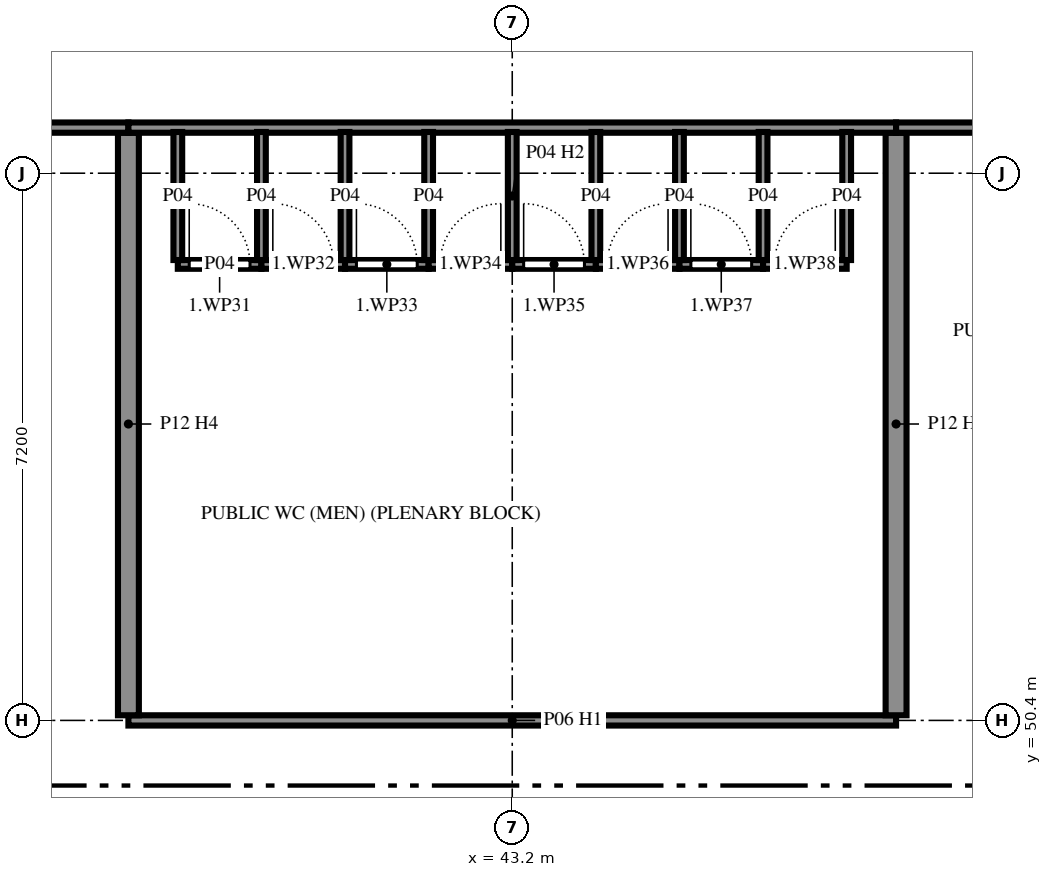
"""IFC4 building model, lengths in metres.
Left out: names, types, materials, properties, quantities, classifications, styles, units other than length and angle.
Written with IfcOpenShell. Run it as: python <this file> out.ifc"""

import sys

from ifc_helpers import new_model, si_unit, direction, frame, frame_2d, origin, place, context, subcontext, project, spatial, rectangle, extrude, element, fill, save


model = new_model("IFC4")
c1 = context("Model", 3, precision=1e-05, world=origin(), true_north=direction((0.0, 1.0)))
c2 = subcontext(c1, "Body", "Model", "MODEL_VIEW")
j1 = project(units=[si_unit("LENGTHUNIT", "METRE"), si_unit("PLANEANGLEUNIT", "RADIAN")], contexts=[c1])
p1 = place(None, origin())
s1 = spatial("IfcSite", under=j1, at=p1, CompositionType="ELEMENT")
p2 = place(p1, origin())
s2 = spatial("IfcBuilding", under=s1, at=p2, CompositionType="ELEMENT")
p3 = place(p2, frame((0.0, 0.0, 3.6)))
s3 = spatial("IfcBuildingStorey", under=s2, at=p3, CompositionType="ELEMENT", Elevation=3.6)
p4 = place(p3, frame((36.0, 50.4, 0.0), z_axis=(0.0, 0.0, 1.0), x_axis=(1.0, 0.0, 0.0)))
e1 = element("IfcWall", 1, at=p4, inside=s3, PredefinedType="PARTITIONING", context=c2, shape_type="SweptSolid", body=[
    extrude(rectangle(XDim=2.15, YDim=0.135, at=frame_2d((1.075, 0.0))), origin(), (0.0, 0.0, 1.0), 2.82),
])
p5 = place(p3, frame((38.15, 50.4, 0.0), z_axis=(0.0, 0.0, 1.0), x_axis=(1.0, 0.0, 0.0)))
e2 = element("IfcWall", 2, at=p5, inside=s3, PredefinedType="PARTITIONING", context=c2, shape_type="SweptSolid", body=[
    extrude(rectangle(XDim=10.1, YDim=0.135, at=frame_2d((5.05, 0.0))), origin(), (0.0, 0.0, 1.0), 2.82),
])
p6 = place(p5, frame((4.55, 0.0, 0.0)))
e3 = element("IfcOpeningElement", 3, at=p6, cuts=e2, PredefinedType="OPENING", context=c2, shape_type="SweptSolid", body=[
    extrude(rectangle(XDim=1.0, YDim=2.4, at=frame_2d((0.5, 1.2))), frame((0.0, 0.077, 0.0), z_axis=(0.0, -1.0, 0.0), x_axis=(1.0, 0.0, 0.0)), (0.0, 0.0, 1.0), 0.155),
])
p7 = place(p3, frame((48.25, 50.4, 0.0), z_axis=(0.0, 0.0, 1.0), x_axis=(1.0, 0.0, 0.0)))
e4 = element("IfcWall", 4, at=p7, inside=s3, PredefinedType="PARTITIONING", context=c2, shape_type="SweptSolid", body=[
    extrude(rectangle(XDim=2.15, YDim=0.135, at=frame_2d((1.075, 0.0))), origin(), (0.0, 0.0, 1.0), 2.82),
])
p8 = place(p3, frame((38.15, 58.133, 0.0), z_axis=(0.0, 0.0, 1.0), x_axis=(0.0, -1.0, 0.0)))
e5 = element("IfcWall", 5, at=p8, inside=s3, PredefinedType="PARTITIONING", context=c2, shape_type="SweptSolid", body=[
    extrude(rectangle(XDim=7.665, YDim=0.275, at=frame_2d((3.833, 0.0))), origin(), (0.0, 0.0, 1.0), 3.42),
])
p9 = place(p3, frame((28.1, 58.2, 0.0), z_axis=(0.0, 0.0, 1.0), x_axis=(1.0, 0.0, 0.0)))
e6 = element("IfcWall", 6, at=p9, inside=s3, PredefinedType="PARTITIONING", context=c2, shape_type="SweptSolid", body=[
    extrude(rectangle(XDim=10.05, YDim=0.135, at=frame_2d((5.025, 0.0))), origin(), (0.0, 0.0, 1.0), 3.42),
])
p10 = place(p9, frame((4.55, 0.0, 0.0)))
e7 = element("IfcOpeningElement", 7, at=p10, cuts=e6, PredefinedType="OPENING", context=c2, shape_type="SweptSolid", body=[
    extrude(rectangle(XDim=1.0, YDim=2.4, at=frame_2d((0.5, 1.2))), frame((0.0, 0.077, 0.0), z_axis=(0.0, -1.0, 0.0), x_axis=(1.0, 0.0, 0.0)), (0.0, 0.0, 1.0), 0.155),
])
p11 = place(p3, frame((48.25, 58.133, 0.0), z_axis=(0.0, 0.0, 1.0), x_axis=(0.0, -1.0, 0.0)))
e8 = element("IfcWall", 8, at=p11, inside=s3, PredefinedType="PARTITIONING", context=c2, shape_type="SweptSolid", body=[
    extrude(rectangle(XDim=7.665, YDim=0.275, at=frame_2d((3.833, 0.0))), origin(), (0.0, 0.0, 1.0), 3.42),
])
p12 = place(p3, frame((38.15, 58.2, 0.0), z_axis=(0.0, 0.0, 1.0), x_axis=(1.0, 0.0, 0.0)))
e9 = element("IfcWall", 9, at=p12, inside=s3, PredefinedType="PARTITIONING", context=c2, shape_type="SweptSolid", body=[
    extrude(rectangle(XDim=10.1, YDim=0.135, at=frame_2d((5.05, 0.0))), origin(), (0.0, 0.0, 1.0), 3.42),
])
p13 = place(p3, frame((48.25, 58.2, 0.0), z_axis=(0.0, 0.0, 1.0), x_axis=(1.0, 0.0, 0.0)))
e10 = element("IfcWall", 10, at=p13, inside=s3, PredefinedType="PARTITIONING", context=c2, shape_type="SweptSolid", body=[
    extrude(rectangle(XDim=10.05, YDim=0.135, at=frame_2d((5.025, 0.0))), origin(), (0.0, 0.0, 1.0), 3.42),
])
p14 = place(p13, frame((4.55, 0.0, 0.0)))
e11 = element("IfcOpeningElement", 11, at=p14, cuts=e10, PredefinedType="OPENING", context=c2, shape_type="SweptSolid", body=[
    extrude(rectangle(XDim=1.0, YDim=2.4, at=frame_2d((0.5, 1.2))), frame((0.0, 0.077, 0.0), z_axis=(0.0, -1.0, 0.0), x_axis=(1.0, 0.0, 0.0)), (0.0, 0.0, 1.0), 0.155),
])
p15 = place(p3, frame((38.8, 56.4, 0.0), z_axis=(0.0, 0.0, 1.0), x_axis=(1.0, 0.0, 0.0)))
e12 = element("IfcWall", 12, at=p15, inside=s3, PredefinedType="PARTITIONING", context=c2, shape_type="SweptSolid", body=[
    extrude(rectangle(XDim=1.1, YDim=0.115, at=frame_2d((0.55, 0.0))), origin(), (0.0, 0.0, 1.0), 3.42),
])
p16 = place(p15, frame((0.15, 0.0, 0.0)))
e13 = element("IfcOpeningElement", 13, at=p16, cuts=e12, PredefinedType="OPENING", context=c2, shape_type="SweptSolid", body=[
    extrude(rectangle(XDim=0.8, YDim=2.1, at=frame_2d((0.4, 1.05))), frame((0.0, 0.067, 0.0), z_axis=(0.0, -1.0, 0.0), x_axis=(1.0, 0.0, 0.0)), (0.0, 0.0, 1.0), 0.135),
])
p17 = place(p3, frame((38.8, 58.143, 0.0), z_axis=(0.0, 0.0, 1.0), x_axis=(0.0, -1.0, 0.0)))
e14 = element("IfcWall", 14, at=p17, inside=s3, PredefinedType="PARTITIONING", context=c2, shape_type="SweptSolid", body=[
    extrude(rectangle(XDim=1.685, YDim=0.115, at=frame_2d((0.843, 0.0))), origin(), (0.0, 0.0, 1.0), 3.42),
])
p18 = place(p3, frame((39.9, 56.4, 0.0), z_axis=(0.0, 0.0, 1.0), x_axis=(1.0, 0.0, 0.0)))
e15 = element("IfcWall", 15, at=p18, inside=s3, PredefinedType="PARTITIONING", context=c2, shape_type="SweptSolid", body=[
    extrude(rectangle(XDim=1.1, YDim=0.115, at=frame_2d((0.55, 0.0))), origin(), (0.0, 0.0, 1.0), 3.42),
])
p19 = place(p18, frame((0.15, 0.0, 0.0)))
e16 = element("IfcOpeningElement", 16, at=p19, cuts=e15, PredefinedType="OPENING", context=c2, shape_type="SweptSolid", body=[
    extrude(rectangle(XDim=0.8, YDim=2.1, at=frame_2d((0.4, 1.05))), frame((0.0, 0.067, 0.0), z_axis=(0.0, -1.0, 0.0), x_axis=(1.0, 0.0, 0.0)), (0.0, 0.0, 1.0), 0.135),
])
p20 = place(p3, frame((39.9, 58.143, 0.0), z_axis=(0.0, 0.0, 1.0), x_axis=(0.0, -1.0, 0.0)))
e17 = element("IfcWall", 17, at=p20, inside=s3, PredefinedType="PARTITIONING", context=c2, shape_type="SweptSolid", body=[
    extrude(rectangle(XDim=1.685, YDim=0.115, at=frame_2d((0.843, 0.0))), origin(), (0.0, 0.0, 1.0), 3.42),
])
p21 = place(p3, frame((41.0, 56.4, 0.0), z_axis=(0.0, 0.0, 1.0), x_axis=(1.0, 0.0, 0.0)))
e18 = element("IfcWall", 18, at=p21, inside=s3, PredefinedType="PARTITIONING", context=c2, shape_type="SweptSolid", body=[
    extrude(rectangle(XDim=1.1, YDim=0.115, at=frame_2d((0.55, 0.0))), origin(), (0.0, 0.0, 1.0), 3.42),
])
p22 = place(p21, frame((0.15, 0.0, 0.0)))
e19 = element("IfcOpeningElement", 19, at=p22, cuts=e18, PredefinedType="OPENING", context=c2, shape_type="SweptSolid", body=[
    extrude(rectangle(XDim=0.8, YDim=2.1, at=frame_2d((0.4, 1.05))), frame((0.0, 0.067, 0.0), z_axis=(0.0, -1.0, 0.0), x_axis=(1.0, 0.0, 0.0)), (0.0, 0.0, 1.0), 0.135),
])
p23 = place(p3, frame((41.0, 58.143, 0.0), z_axis=(0.0, 0.0, 1.0), x_axis=(0.0, -1.0, 0.0)))
e20 = element("IfcWall", 20, at=p23, inside=s3, PredefinedType="PARTITIONING", context=c2, shape_type="SweptSolid", body=[
    extrude(rectangle(XDim=1.685, YDim=0.115, at=frame_2d((0.843, 0.0))), origin(), (0.0, 0.0, 1.0), 3.42),
])
p24 = place(p3, frame((42.1, 56.4, 0.0), z_axis=(0.0, 0.0, 1.0), x_axis=(1.0, 0.0, 0.0)))
e21 = element("IfcWall", 21, at=p24, inside=s3, PredefinedType="PARTITIONING", context=c2, shape_type="SweptSolid", body=[
    extrude(rectangle(XDim=1.1, YDim=0.115, at=frame_2d((0.55, 0.0))), origin(), (0.0, 0.0, 1.0), 3.42),
])
p25 = place(p24, frame((0.15, 0.0, 0.0)))
e22 = element("IfcOpeningElement", 22, at=p25, cuts=e21, PredefinedType="OPENING", context=c2, shape_type="SweptSolid", body=[
    extrude(rectangle(XDim=0.8, YDim=2.1, at=frame_2d((0.4, 1.05))), frame((0.0, 0.067, 0.0), z_axis=(0.0, -1.0, 0.0), x_axis=(1.0, 0.0, 0.0)), (0.0, 0.0, 1.0), 0.135),
])
p26 = place(p3, frame((42.1, 58.143, 0.0), z_axis=(0.0, 0.0, 1.0), x_axis=(0.0, -1.0, 0.0)))
e23 = element("IfcWall", 23, at=p26, inside=s3, PredefinedType="PARTITIONING", context=c2, shape_type="SweptSolid", body=[
    extrude(rectangle(XDim=1.685, YDim=0.115, at=frame_2d((0.843, 0.0))), origin(), (0.0, 0.0, 1.0), 3.42),
])
p27 = place(p3, frame((43.2, 56.4, 0.0), z_axis=(0.0, 0.0, 1.0), x_axis=(1.0, 0.0, 0.0)))
e24 = element("IfcWall", 24, at=p27, inside=s3, PredefinedType="PARTITIONING", context=c2, shape_type="SweptSolid", body=[
    extrude(rectangle(XDim=1.1, YDim=0.115, at=frame_2d((0.55, 0.0))), origin(), (0.0, 0.0, 1.0), 3.42),
])
p28 = place(p27, frame((0.15, 0.0, 0.0)))
e25 = element("IfcOpeningElement", 25, at=p28, cuts=e24, PredefinedType="OPENING", context=c2, shape_type="SweptSolid", body=[
    extrude(rectangle(XDim=0.8, YDim=2.1, at=frame_2d((0.4, 1.05))), frame((0.0, 0.067, 0.0), z_axis=(0.0, -1.0, 0.0), x_axis=(1.0, 0.0, 0.0)), (0.0, 0.0, 1.0), 0.135),
])
p29 = place(p3, frame((43.2, 58.143, 0.0), z_axis=(0.0, 0.0, 1.0), x_axis=(0.0, -1.0, 0.0)))
e26 = element("IfcWall", 26, at=p29, inside=s3, PredefinedType="PARTITIONING", context=c2, shape_type="SweptSolid", body=[
    extrude(rectangle(XDim=1.685, YDim=0.115, at=frame_2d((0.843, 0.0))), origin(), (0.0, 0.0, 1.0), 3.12),
])
p30 = place(p3, frame((44.3, 56.4, 0.0), z_axis=(0.0, 0.0, 1.0), x_axis=(1.0, 0.0, 0.0)))
e27 = element("IfcWall", 27, at=p30, inside=s3, PredefinedType="PARTITIONING", context=c2, shape_type="SweptSolid", body=[
    extrude(rectangle(XDim=1.1, YDim=0.115, at=frame_2d((0.55, 0.0))), origin(), (0.0, 0.0, 1.0), 3.42),
])
p31 = place(p30, frame((0.15, 0.0, 0.0)))
e28 = element("IfcOpeningElement", 28, at=p31, cuts=e27, PredefinedType="OPENING", context=c2, shape_type="SweptSolid", body=[
    extrude(rectangle(XDim=0.8, YDim=2.1, at=frame_2d((0.4, 1.05))), frame((0.0, 0.067, 0.0), z_axis=(0.0, -1.0, 0.0), x_axis=(1.0, 0.0, 0.0)), (0.0, 0.0, 1.0), 0.135),
])
p32 = place(p3, frame((44.3, 58.143, 0.0), z_axis=(0.0, 0.0, 1.0), x_axis=(0.0, -1.0, 0.0)))
e29 = element("IfcWall", 29, at=p32, inside=s3, PredefinedType="PARTITIONING", context=c2, shape_type="SweptSolid", body=[
    extrude(rectangle(XDim=1.685, YDim=0.115, at=frame_2d((0.843, 0.0))), origin(), (0.0, 0.0, 1.0), 3.42),
])
p33 = place(p3, frame((45.4, 56.4, 0.0), z_axis=(0.0, 0.0, 1.0), x_axis=(1.0, 0.0, 0.0)))
e30 = element("IfcWall", 30, at=p33, inside=s3, PredefinedType="PARTITIONING", context=c2, shape_type="SweptSolid", body=[
    extrude(rectangle(XDim=1.1, YDim=0.115, at=frame_2d((0.55, 0.0))), origin(), (0.0, 0.0, 1.0), 3.42),
])
p34 = place(p33, frame((0.15, 0.0, 0.0)))
e31 = element("IfcOpeningElement", 31, at=p34, cuts=e30, PredefinedType="OPENING", context=c2, shape_type="SweptSolid", body=[
    extrude(rectangle(XDim=0.8, YDim=2.1, at=frame_2d((0.4, 1.05))), frame((0.0, 0.067, 0.0), z_axis=(0.0, -1.0, 0.0), x_axis=(1.0, 0.0, 0.0)), (0.0, 0.0, 1.0), 0.135),
])
p35 = place(p3, frame((45.4, 58.143, 0.0), z_axis=(0.0, 0.0, 1.0), x_axis=(0.0, -1.0, 0.0)))
e32 = element("IfcWall", 32, at=p35, inside=s3, PredefinedType="PARTITIONING", context=c2, shape_type="SweptSolid", body=[
    extrude(rectangle(XDim=1.685, YDim=0.115, at=frame_2d((0.843, 0.0))), origin(), (0.0, 0.0, 1.0), 3.42),
])
p36 = place(p3, frame((46.5, 56.4, 0.0), z_axis=(0.0, 0.0, 1.0), x_axis=(1.0, 0.0, 0.0)))
e33 = element("IfcWall", 33, at=p36, inside=s3, PredefinedType="PARTITIONING", context=c2, shape_type="SweptSolid", body=[
    extrude(rectangle(XDim=1.1, YDim=0.115, at=frame_2d((0.55, 0.0))), origin(), (0.0, 0.0, 1.0), 3.42),
])
p37 = place(p36, frame((0.15, 0.0, 0.0)))
e34 = element("IfcOpeningElement", 34, at=p37, cuts=e33, PredefinedType="OPENING", context=c2, shape_type="SweptSolid", body=[
    extrude(rectangle(XDim=0.8, YDim=2.1, at=frame_2d((0.4, 1.05))), frame((0.0, 0.067, 0.0), z_axis=(0.0, -1.0, 0.0), x_axis=(1.0, 0.0, 0.0)), (0.0, 0.0, 1.0), 0.135),
])
for number, where, z_axis, x_axis in (
    (35, (46.5, 58.143, 0.0), (0.0, 0.0, 1.0), (0.0, -1.0, 0.0)),
    (36, (47.6, 58.143, 0.0), (0.0, 0.0, 1.0), (0.0, -1.0, 0.0)),
):
    element("IfcWall", number, at=place(p3, frame(where, z_axis=z_axis, x_axis=x_axis)), inside=s3, PredefinedType="PARTITIONING", context=c2, shape_type="SweptSolid", body=[
        extrude(rectangle(XDim=1.685, YDim=0.115, at=frame_2d((0.843, 0.0))), origin(), (0.0, 0.0, 1.0), 3.42),
    ])
p38 = place(p6, origin())
e37 = element("IfcDoor", 37, at=p38, inside=s3, OperationType="SINGLE_SWING_RIGHT", PredefinedType="DOOR", context=c2, shape_type="SweptSolid", body=[
    extrude(rectangle(XDim=1.0, YDim=2.4, at=frame_2d((0.5, 1.2))), frame((0.0, 0.025, 0.0), z_axis=(0.0, -1.0, 0.0), x_axis=(1.0, 0.0, 0.0)), (0.0, 0.0, 1.0), 0.05),
])
fill(e3, e37)
p39 = place(p16, origin())
e38 = element("IfcDoor", 38, at=p39, inside=s3, OperationType="SINGLE_SWING_RIGHT", PredefinedType="DOOR", context=c2, shape_type="SweptSolid", body=[
    extrude(rectangle(XDim=0.8, YDim=2.1, at=frame_2d((0.4, 1.05))), frame((0.0, 0.025, 0.0), z_axis=(0.0, -1.0, 0.0), x_axis=(1.0, 0.0, 0.0)), (0.0, 0.0, 1.0), 0.05),
])
fill(e13, e38)
p40 = place(p19, origin())
e39 = element("IfcDoor", 39, at=p40, inside=s3, OperationType="SINGLE_SWING_RIGHT", PredefinedType="DOOR", context=c2, shape_type="SweptSolid", body=[
    extrude(rectangle(XDim=0.8, YDim=2.1, at=frame_2d((0.4, 1.05))), frame((0.0, 0.025, 0.0), z_axis=(0.0, -1.0, 0.0), x_axis=(1.0, 0.0, 0.0)), (0.0, 0.0, 1.0), 0.05),
])
fill(e16, e39)
p41 = place(p22, origin())
e40 = element("IfcDoor", 40, at=p41, inside=s3, OperationType="SINGLE_SWING_RIGHT", PredefinedType="DOOR", context=c2, shape_type="SweptSolid", body=[
    extrude(rectangle(XDim=0.8, YDim=2.1, at=frame_2d((0.4, 1.05))), frame((0.0, 0.025, 0.0), z_axis=(0.0, -1.0, 0.0), x_axis=(1.0, 0.0, 0.0)), (0.0, 0.0, 1.0), 0.05),
])
fill(e19, e40)
p42 = place(p25, origin())
e41 = element("IfcDoor", 41, at=p42, inside=s3, OperationType="SINGLE_SWING_LEFT", PredefinedType="DOOR", context=c2, shape_type="SweptSolid", body=[
    extrude(rectangle(XDim=0.8, YDim=2.1, at=frame_2d((0.4, 1.05))), frame((0.0, 0.025, 0.0), z_axis=(0.0, -1.0, 0.0), x_axis=(1.0, 0.0, 0.0)), (0.0, 0.0, 1.0), 0.05),
])
fill(e22, e41)
p43 = place(p28, origin())
e42 = element("IfcDoor", 42, at=p43, inside=s3, OperationType="SINGLE_SWING_RIGHT", PredefinedType="DOOR", context=c2, shape_type="SweptSolid", body=[
    extrude(rectangle(XDim=0.8, YDim=2.1, at=frame_2d((0.4, 1.05))), frame((0.0, 0.025, 0.0), z_axis=(0.0, -1.0, 0.0), x_axis=(1.0, 0.0, 0.0)), (0.0, 0.0, 1.0), 0.05),
])
fill(e25, e42)
p44 = place(p31, origin())
e43 = element("IfcDoor", 43, at=p44, inside=s3, OperationType="SINGLE_SWING_LEFT", PredefinedType="DOOR", context=c2, shape_type="SweptSolid", body=[
    extrude(rectangle(XDim=0.8, YDim=2.1, at=frame_2d((0.4, 1.05))), frame((0.0, 0.025, 0.0), z_axis=(0.0, -1.0, 0.0), x_axis=(1.0, 0.0, 0.0)), (0.0, 0.0, 1.0), 0.05),
])
fill(e28, e43)
p45 = place(p34, origin())
e44 = element("IfcDoor", 44, at=p45, inside=s3, OperationType="SINGLE_SWING_RIGHT", PredefinedType="DOOR", context=c2, shape_type="SweptSolid", body=[
    extrude(rectangle(XDim=0.8, YDim=2.1, at=frame_2d((0.4, 1.05))), frame((0.0, 0.025, 0.0), z_axis=(0.0, -1.0, 0.0), x_axis=(1.0, 0.0, 0.0)), (0.0, 0.0, 1.0), 0.05),
])
fill(e31, e44)
p46 = place(p37, origin())
e45 = element("IfcDoor", 45, at=p46, inside=s3, OperationType="SINGLE_SWING_LEFT", PredefinedType="DOOR", context=c2, shape_type="SweptSolid", body=[
    extrude(rectangle(XDim=0.8, YDim=2.1, at=frame_2d((0.4, 1.05))), frame((0.0, 0.025, 0.0), z_axis=(0.0, -1.0, 0.0), x_axis=(1.0, 0.0, 0.0)), (0.0, 0.0, 1.0), 0.05),
])
fill(e34, e45)
save(model, sys.argv[1])
